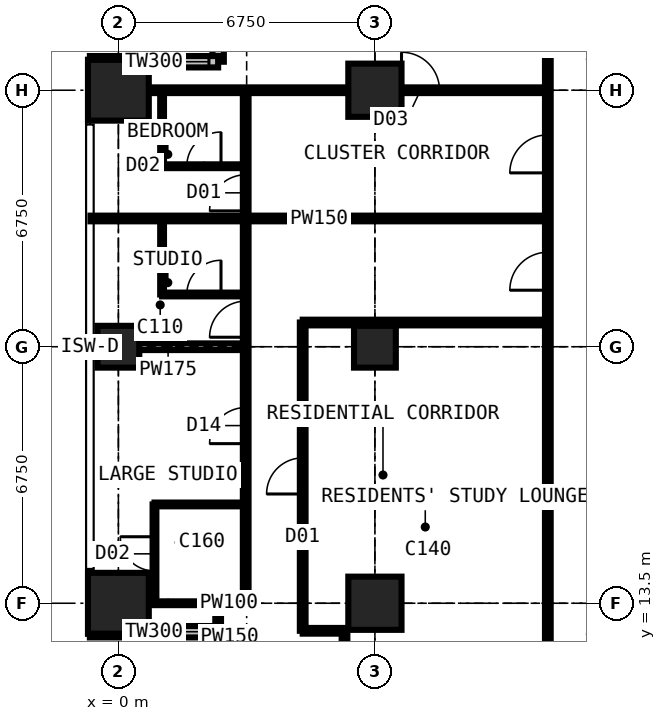
"""IFC4 building model, lengths in metres.
Left out: names, types, materials, properties, quantities, classifications, styles, units other than length and angle.
Written with IfcOpenShell. Run it as: python <this file> out.ifc"""

import sys

from ifc_helpers import new_model, si_unit, direction, frame, frame_2d, origin, origin_2d, place, context, subcontext, project, spatial, rectangle, extrude, element, fill, save


model = new_model("IFC4")
c1 = context("Model", 3, precision=1e-05, world=origin(), true_north=direction((0.0, 1.0)))
c2 = subcontext(c1, "Body", "Model", "MODEL_VIEW")
j1 = project(units=[si_unit("LENGTHUNIT", "METRE"), si_unit("PLANEANGLEUNIT", "RADIAN")], contexts=[c1])
p1 = place(None, origin())
s1 = spatial("IfcSite", under=j1, at=p1, CompositionType="ELEMENT")
p2 = place(p1, origin())
s2 = spatial("IfcBuilding", under=s1, at=p2, CompositionType="ELEMENT")
p3 = place(p2, frame((0.0, 0.0, 207.9)))
s3 = spatial("IfcBuildingStorey", under=s2, at=p3, CompositionType="ELEMENT", Elevation=207.9)
p4 = place(p3, frame((0.0, 13.5, 0.0), z_axis=(0.0, 0.0, 1.0), x_axis=(1.0, 0.0, 0.0)))
e1 = element("IfcColumn", 1, at=p4, inside=s3, PredefinedType="COLUMN", context=c2, shape_type="SweptSolid", body=[
    extrude(rectangle(XDim=1.6, YDim=1.6, at=origin_2d()), origin(), (0.0, 0.0, 1.0), 3.6),
])
p5 = place(p3, frame((0.0, 20.25, 0.0), z_axis=(0.0, 0.0, 1.0), x_axis=(1.0, 0.0, 0.0)))
e2 = element("IfcColumn", 2, at=p5, inside=s3, PredefinedType="COLUMN", context=c2, shape_type="SweptSolid", body=[
    extrude(rectangle(XDim=1.1, YDim=1.1, at=origin_2d()), origin(), (0.0, 0.0, 1.0), 3.6),
])
p6 = place(p3, frame((0.0, 27.0, 0.0), z_axis=(0.0, 0.0, 1.0), x_axis=(1.0, 0.0, 0.0)))
e3 = element("IfcColumn", 3, at=p6, inside=s3, PredefinedType="COLUMN", context=c2, shape_type="SweptSolid", body=[
    extrude(rectangle(XDim=1.6, YDim=1.6, at=origin_2d()), origin(), (0.0, 0.0, 1.0), 3.6),
])
p7 = place(p3, frame((6.75, 13.5, 0.0), z_axis=(0.0, 0.0, 1.0), x_axis=(1.0, 0.0, 0.0)))
e4 = element("IfcColumn", 4, at=p7, inside=s3, PredefinedType="COLUMN", context=c2, shape_type="SweptSolid", body=[
    extrude(rectangle(XDim=1.4, YDim=1.4, at=origin_2d()), origin(), (0.0, 0.0, 1.0), 3.6),
])
p8 = place(p3, frame((6.75, 20.25, 0.0), z_axis=(0.0, 0.0, 1.0), x_axis=(1.0, 0.0, 0.0)))
e5 = element("IfcColumn", 5, at=p8, inside=s3, PredefinedType="COLUMN", context=c2, shape_type="SweptSolid", body=[
    extrude(rectangle(XDim=1.1, YDim=1.1, at=origin_2d()), origin(), (0.0, 0.0, 1.0), 3.6),
])
p9 = place(p3, frame((6.75, 27.0, 0.0), z_axis=(0.0, 0.0, 1.0), x_axis=(1.0, 0.0, 0.0)))
e6 = element("IfcColumn", 6, at=p9, inside=s3, PredefinedType="COLUMN", context=c2, shape_type="SweptSolid", body=[
    extrude(rectangle(XDim=1.4, YDim=1.4, at=origin_2d()), origin(), (0.0, 0.0, 1.0), 3.6),
])
p10 = place(p3, frame((2.625, 31.125, 0.0), z_axis=(0.0, 0.0, 1.0), x_axis=(0.0, -1.0, 0.0)))
e7 = element("IfcWall", 7, at=p10, inside=s3, PredefinedType="SOLIDWALL", context=c2, shape_type="SweptSolid", body=[
    extrude(rectangle(XDim=3.375, YDim=0.3, at=frame_2d((1.688, 0.0))), origin(), (0.0, 0.0, 1.0), 3.375),
])
p11 = place(p10, frame((0.788, 0.0, 0.6)))
e8 = element("IfcOpeningElement", 8, at=p11, cuts=e7, PredefinedType="OPENING", context=c2, shape_type="SweptSolid", body=[
    extrude(rectangle(XDim=1.8, YDim=2.1, at=frame_2d((0.9, 1.05))), frame((0.0, 0.16, 0.0), z_axis=(0.0, -1.0, 0.0), x_axis=(1.0, 0.0, 0.0)), (0.0, 0.0, 1.0), 0.32),
])
p12 = place(p3, frame((2.625, 27.75, 0.0), z_axis=(0.0, 0.0, 1.0), x_axis=(-1.0, 0.0, 0.0)))
e9 = element("IfcWall", 9, at=p12, inside=s3, PredefinedType="SOLIDWALL", context=c2, shape_type="SweptSolid", body=[
    extrude(rectangle(XDim=3.375, YDim=0.3, at=frame_2d((1.688, 0.0))), origin(), (0.0, 0.0, 1.0), 3.375),
])
p13 = place(p12, frame((0.242, 0.0, 0.9)))
e10 = element("IfcOpeningElement", 10, at=p13, cuts=e9, PredefinedType="OPENING", context=c2, shape_type="SweptSolid", body=[
    extrude(rectangle(XDim=1.5, YDim=1.8, at=frame_2d((0.75, 0.9))), frame((0.0, 0.16, 0.0), z_axis=(0.0, -1.0, 0.0), x_axis=(1.0, 0.0, 0.0)), (0.0, 0.0, 1.0), 0.32),
])
p14 = place(p3, frame((-0.75, 12.75, 0.0), z_axis=(0.0, 0.0, 1.0), x_axis=(1.0, 0.0, 0.0)))
e11 = element("IfcWall", 11, at=p14, inside=s3, PredefinedType="SOLIDWALL", context=c2, shape_type="SweptSolid", body=[
    extrude(rectangle(XDim=3.375, YDim=0.3, at=frame_2d((1.688, 0.0))), origin(), (0.0, 0.0, 1.0), 3.375),
])
p15 = place(p14, frame((1.633, 0.0, 0.9)))
e12 = element("IfcOpeningElement", 12, at=p15, cuts=e11, PredefinedType="OPENING", context=c2, shape_type="SweptSolid", body=[
    extrude(rectangle(XDim=1.5, YDim=1.8, at=frame_2d((0.75, 0.9))), frame((0.0, 0.16, 0.0), z_axis=(0.0, -1.0, 0.0), x_axis=(1.0, 0.0, 0.0)), (0.0, 0.0, 1.0), 0.32),
])
p16 = place(p3, frame((2.625, 12.75, 0.0), z_axis=(0.0, 0.0, 1.0), x_axis=(0.0, -1.0, 0.0)))
e13 = element("IfcWall", 13, at=p16, inside=s3, PredefinedType="SOLIDWALL", context=c2, shape_type="SweptSolid", body=[
    extrude(rectangle(XDim=3.375, YDim=0.3, at=frame_2d((1.688, 0.0))), origin(), (0.0, 0.0, 1.0), 3.375),
])
p17 = place(p16, frame((0.788, 0.0, 0.6)))
e14 = element("IfcOpeningElement", 14, at=p17, cuts=e13, PredefinedType="OPENING", context=c2, shape_type="SweptSolid", body=[
    extrude(rectangle(XDim=1.8, YDim=2.1, at=frame_2d((0.9, 1.05))), frame((0.0, 0.16, 0.0), z_axis=(0.0, -1.0, 0.0), x_axis=(1.0, 0.0, 0.0)), (0.0, 0.0, 1.0), 0.32),
])
p18 = place(p3, frame((-0.734, 13.5, 0.0), z_axis=(0.0, 0.0, 1.0), x_axis=(1.0, 0.0, 0.0)))
e15 = element("IfcWall", 15, at=p18, inside=s3, PredefinedType="PARTITIONING", context=c2, shape_type="SweptSolid", body=[
    extrude(rectangle(XDim=4.084, YDim=0.1, at=frame_2d((2.042, 0.0))), origin(), (0.0, 0.0, 1.0), 2.877),
])
p19 = place(p3, frame((-0.734, 20.25, 0.0), z_axis=(0.0, 0.0, 1.0), x_axis=(1.0, 0.0, 0.0)))
e16 = element("IfcWall", 16, at=p19, inside=s3, PredefinedType="PARTITIONING", context=c2, shape_type="SweptSolid", body=[
    extrude(rectangle(XDim=4.084, YDim=0.175, at=frame_2d((2.042, 0.0))), origin(), (0.0, 0.0, 1.0), 2.877),
])
p20 = place(p3, frame((-0.734, 23.625, 0.0), z_axis=(0.0, 0.0, 1.0), x_axis=(1.0, 0.0, 0.0)))
e17 = element("IfcWall", 17, at=p20, inside=s3, PredefinedType="PARTITIONING", context=c2, shape_type="SweptSolid", body=[
    extrude(rectangle(XDim=12.034, YDim=0.15, at=frame_2d((6.017, 0.0))), origin(), (0.0, 0.0, 1.0), 3.375),
])
p21 = place(p3, frame((-0.734, 27.0, 0.0), z_axis=(0.0, 0.0, 1.0), x_axis=(1.0, 0.0, 0.0)))
e18 = element("IfcWall", 18, at=p21, inside=s3, PredefinedType="PARTITIONING", context=c2, shape_type="SweptSolid", body=[
    extrude(rectangle(XDim=12.034, YDim=0.15, at=frame_2d((6.017, 0.0))), origin(), (0.0, 0.0, 1.0), 2.877),
])
p22 = place(p21, frame((8.184, 0.0, 0.0)))
e19 = element("IfcOpeningElement", 19, at=p22, cuts=e18, PredefinedType="OPENING", context=c2, shape_type="SweptSolid", body=[
    extrude(rectangle(XDim=1.0, YDim=2.2, at=frame_2d((0.5, 1.1))), frame((0.0, 0.085, 0.0), z_axis=(0.0, -1.0, 0.0), x_axis=(1.0, 0.0, 0.0)), (0.0, 0.0, 1.0), 0.17),
])
p23 = place(p3, frame((0.95, 13.5, 0.0), z_axis=(0.0, 0.0, 1.0), x_axis=(0.0, 1.0, 0.0)))
e20 = element("IfcWall", 20, at=p23, inside=s3, PredefinedType="PARTITIONING", context=c2, shape_type="SweptSolid", body=[
    extrude(rectangle(XDim=2.6, YDim=0.1, at=frame_2d((1.3, 0.0))), origin(), (0.0, 0.0, 1.0), 3.375),
])
p24 = place(p23, frame((0.85, 0.0, 0.0)))
e21 = element("IfcOpeningElement", 21, at=p24, cuts=e20, PredefinedType="OPENING", context=c2, shape_type="SweptSolid", body=[
    extrude(rectangle(XDim=0.9, YDim=2.2, at=frame_2d((0.45, 1.1))), frame((0.0, 0.06, 0.0), z_axis=(0.0, -1.0, 0.0), x_axis=(1.0, 0.0, 0.0)), (0.0, 0.0, 1.0), 0.12),
])
p25 = place(p3, frame((0.95, 16.1, 0.0), z_axis=(0.0, 0.0, 1.0), x_axis=(1.0, 0.0, 0.0)))
e22 = element("IfcWall", 22, at=p25, inside=s3, PredefinedType="PARTITIONING", context=c2, shape_type="SweptSolid", body=[
    extrude(rectangle(XDim=2.4, YDim=0.1, at=frame_2d((1.2, 0.0))), origin(), (0.0, 0.0, 1.0), 3.375),
])
p26 = place(p3, frame((1.15, 21.625, 0.0), z_axis=(0.0, 0.0, 1.0), x_axis=(0.0, 1.0, 0.0)))
e23 = element("IfcWall", 23, at=p26, inside=s3, PredefinedType="PARTITIONING", context=c2, shape_type="SweptSolid", body=[
    extrude(rectangle(XDim=2.0, YDim=0.1, at=frame_2d((1.0, 0.0))), origin(), (0.0, 0.0, 1.0), 3.375),
])
p27 = place(p3, frame((1.15, 21.625, 0.0), z_axis=(0.0, 0.0, 1.0), x_axis=(1.0, 0.0, 0.0)))
e24 = element("IfcWall", 24, at=p27, inside=s3, PredefinedType="PARTITIONING", context=c2, shape_type="SweptSolid", body=[
    extrude(rectangle(XDim=2.2, YDim=0.1, at=frame_2d((1.1, 0.0))), origin(), (0.0, 0.0, 1.0), 3.375),
])
p28 = place(p27, frame((0.65, 0.0, 0.0)))
e25 = element("IfcOpeningElement", 25, at=p28, cuts=e24, PredefinedType="OPENING", context=c2, shape_type="SweptSolid", body=[
    extrude(rectangle(XDim=0.9, YDim=2.2, at=frame_2d((0.45, 1.1))), frame((0.0, 0.06, 0.0), z_axis=(0.0, -1.0, 0.0), x_axis=(1.0, 0.0, 0.0)), (0.0, 0.0, 1.0), 0.12),
])
p29 = place(p3, frame((1.15, 25.0, 0.0), z_axis=(0.0, 0.0, 1.0), x_axis=(0.0, 1.0, 0.0)))
e26 = element("IfcWall", 26, at=p29, inside=s3, PredefinedType="PARTITIONING", context=c2, shape_type="SweptSolid", body=[
    extrude(rectangle(XDim=2.0, YDim=0.1, at=frame_2d((1.0, 0.0))), origin(), (0.0, 0.0, 1.0), 3.375),
])
p30 = place(p3, frame((1.15, 25.0, 0.0), z_axis=(0.0, 0.0, 1.0), x_axis=(1.0, 0.0, 0.0)))
e27 = element("IfcWall", 27, at=p30, inside=s3, PredefinedType="PARTITIONING", context=c2, shape_type="SweptSolid", body=[
    extrude(rectangle(XDim=2.2, YDim=0.1, at=frame_2d((1.1, 0.0))), origin(), (0.0, 0.0, 1.0), 3.375),
])
p31 = place(p30, frame((0.65, 0.0, 0.0)))
e28 = element("IfcOpeningElement", 28, at=p31, cuts=e27, PredefinedType="OPENING", context=c2, shape_type="SweptSolid", body=[
    extrude(rectangle(XDim=0.9, YDim=2.2, at=frame_2d((0.45, 1.1))), frame((0.0, 0.06, 0.0), z_axis=(0.0, -1.0, 0.0), x_axis=(1.0, 0.0, 0.0)), (0.0, 0.0, 1.0), 0.12),
])
p32 = place(p3, frame((2.625, 12.766, 0.0), z_axis=(0.0, 0.0, 1.0), x_axis=(0.0, 1.0, 0.0)))
e29 = element("IfcWall", 29, at=p32, inside=s3, PredefinedType="PARTITIONING", context=c2, shape_type="SweptSolid", body=[
    extrude(rectangle(XDim=0.734, YDim=0.15, at=frame_2d((0.367, 0.0))), origin(), (0.0, 0.0, 1.0), 3.375),
])
p33 = place(p3, frame((3.35, 13.5, 0.0), z_axis=(0.0, 0.0, 1.0), x_axis=(0.0, 1.0, 0.0)))
e30 = element("IfcWall", 30, at=p33, inside=s3, PredefinedType="PARTITIONING", context=c2, shape_type="SweptSolid", body=[
    extrude(rectangle(XDim=13.5, YDim=0.15, at=frame_2d((6.75, 0.0))), origin(), (0.0, 0.0, 1.0), 3.375),
])
p34 = place(p33, frame((10.325, 0.0, 0.0)))
e31 = element("IfcOpeningElement", 31, at=p34, cuts=e30, PredefinedType="OPENING", context=c2, shape_type="SweptSolid", body=[
    extrude(rectangle(XDim=0.95, YDim=2.2, at=frame_2d((0.475, 1.1))), frame((0.0, 0.085, 0.0), z_axis=(0.0, -1.0, 0.0), x_axis=(1.0, 0.0, 0.0)), (0.0, 0.0, 1.0), 0.17),
])
p35 = place(p33, frame((4.2, 0.0, 0.0)))
e32 = element("IfcOpeningElement", 32, at=p35, cuts=e30, PredefinedType="OPENING", context=c2, shape_type="SweptSolid", body=[
    extrude(rectangle(XDim=0.95, YDim=2.2, at=frame_2d((0.475, 1.1))), frame((0.0, 0.085, 0.0), z_axis=(0.0, -1.0, 0.0), x_axis=(1.0, 0.0, 0.0)), (0.0, 0.0, 1.0), 0.17),
])
p36 = place(p33, frame((7.0, 0.0, 0.0)))
e33 = element("IfcOpeningElement", 33, at=p36, cuts=e30, PredefinedType="OPENING", context=c2, shape_type="SweptSolid", body=[
    extrude(rectangle(XDim=0.95, YDim=2.2, at=frame_2d((0.475, 1.1))), frame((0.0, 0.085, 0.0), z_axis=(0.0, -1.0, 0.0), x_axis=(1.0, 0.0, 0.0)), (0.0, 0.0, 1.0), 0.17),
])
p37 = place(p3, frame((4.85, 12.775, 0.0), z_axis=(0.0, 0.0, 1.0), x_axis=(0.0, 1.0, 0.0)))
e34 = element("IfcWall", 34, at=p37, inside=s3, PredefinedType="PARTITIONING", context=c2, shape_type="SweptSolid", body=[
    extrude(rectangle(XDim=8.113, YDim=0.15, at=frame_2d((4.056, 0.0))), origin(), (0.0, 0.0, 1.0), 3.375),
])
p38 = place(p37, frame((3.6, 0.0, 0.0)))
e35 = element("IfcOpeningElement", 35, at=p38, cuts=e34, PredefinedType="OPENING", context=c2, shape_type="SweptSolid", body=[
    extrude(rectangle(XDim=0.95, YDim=2.2, at=frame_2d((0.475, 1.1))), frame((0.0, 0.085, 0.0), z_axis=(0.0, -1.0, 0.0), x_axis=(1.0, 0.0, 0.0)), (0.0, 0.0, 1.0), 0.17),
])
p39 = place(p3, frame((4.85, 12.775, 0.0), z_axis=(0.0, 0.0, 1.0), x_axis=(1.0, 0.0, 0.0)))
e36 = element("IfcWall", 36, at=p39, inside=s3, PredefinedType="PARTITIONING", context=c2, shape_type="SweptSolid", body=[
    extrude(rectangle(XDim=1.1, YDim=0.15, at=frame_2d((0.55, 0.0))), origin(), (0.0, 0.0, 1.0), 3.375),
])
p40 = place(p3, frame((4.85, 20.887, 0.0), z_axis=(0.0, 0.0, 1.0), x_axis=(1.0, 0.0, 0.0)))
e37 = element("IfcWall", 37, at=p40, inside=s3, PredefinedType="PARTITIONING", context=c2, shape_type="SweptSolid", body=[
    extrude(rectangle(XDim=6.45, YDim=0.15, at=frame_2d((3.225, 0.0))), origin(), (0.0, 0.0, 1.0), 3.375),
])
p41 = place(p3, frame((5.95, 10.125, 0.0), z_axis=(0.0, 0.0, 1.0), x_axis=(0.0, 1.0, 0.0)))
e38 = element("IfcWall", 38, at=p41, inside=s3, PredefinedType="PARTITIONING", context=c2, shape_type="SweptSolid", body=[
    extrude(rectangle(XDim=2.65, YDim=0.15, at=frame_2d((1.325, 0.0))), origin(), (0.0, 0.0, 1.0), 3.375),
])
p42 = place(p3, frame((11.3, 11.3, 0.0), z_axis=(0.0, 0.0, 1.0), x_axis=(0.0, 1.0, 0.0)))
e39 = element("IfcWall", 39, at=p42, inside=s3, PredefinedType="PARTITIONING", context=c2, shape_type="SweptSolid", body=[
    extrude(rectangle(XDim=19.3, YDim=0.15, at=frame_2d((9.65, 0.0))), origin(), (0.0, 0.0, 1.0), 3.375),
])
p43 = place(p42, frame((13.525, 0.0, 0.0)))
e40 = element("IfcOpeningElement", 40, at=p43, cuts=e39, PredefinedType="OPENING", context=c2, shape_type="SweptSolid", body=[
    extrude(rectangle(XDim=1.0, YDim=2.2, at=frame_2d((0.5, 1.1))), frame((0.0, 0.085, 0.0), z_axis=(0.0, -1.0, 0.0), x_axis=(1.0, 0.0, 0.0)), (0.0, 0.0, 1.0), 0.17),
])
p44 = place(p42, frame((10.438, 0.0, 0.0)))
e41 = element("IfcOpeningElement", 41, at=p44, cuts=e39, PredefinedType="OPENING", context=c2, shape_type="SweptSolid", body=[
    extrude(rectangle(XDim=1.0, YDim=2.2, at=frame_2d((0.5, 1.1))), frame((0.0, 0.085, 0.0), z_axis=(0.0, -1.0, 0.0), x_axis=(1.0, 0.0, 0.0)), (0.0, 0.0, 1.0), 0.17),
])
p45 = place(p13, origin())
e42 = element("IfcWindow", 42, at=p45, inside=s3, PartitioningType="SINGLE_PANEL", PredefinedType="WINDOW", context=c2, shape_type="SweptSolid", body=[
    extrude(rectangle(XDim=1.5, YDim=1.8, at=frame_2d((0.75, 0.9))), frame((0.0, 0.03, 0.0), z_axis=(0.0, -1.0, 0.0), x_axis=(1.0, 0.0, 0.0)), (0.0, 0.0, 1.0), 0.06),
])
fill(e10, e42)
p46 = place(p15, origin())
e43 = element("IfcWindow", 43, at=p46, inside=s3, PartitioningType="SINGLE_PANEL", PredefinedType="WINDOW", context=c2, shape_type="SweptSolid", body=[
    extrude(rectangle(XDim=1.5, YDim=1.8, at=frame_2d((0.75, 0.9))), frame((0.0, 0.03, 0.0), z_axis=(0.0, -1.0, 0.0), x_axis=(1.0, 0.0, 0.0)), (0.0, 0.0, 1.0), 0.06),
])
fill(e12, e43)
p47 = place(p22, origin())
e44 = element("IfcDoor", 44, at=p47, inside=s3, OperationType="SINGLE_SWING_LEFT", PredefinedType="DOOR", context=c2, shape_type="SweptSolid", body=[
    extrude(rectangle(XDim=1.0, YDim=2.2, at=frame_2d((0.5, 1.1))), frame((0.0, 0.025, 0.0), z_axis=(0.0, -1.0, 0.0), x_axis=(1.0, 0.0, 0.0)), (0.0, 0.0, 1.0), 0.05),
])
fill(e19, e44)
p48 = place(p34, origin())
e45 = element("IfcDoor", 45, at=p48, inside=s3, OperationType="SINGLE_SWING_LEFT", PredefinedType="DOOR", context=c2, shape_type="SweptSolid", body=[
    extrude(rectangle(XDim=0.95, YDim=2.2, at=frame_2d((0.475, 1.1))), frame((0.0, 0.025, 0.0), z_axis=(0.0, -1.0, 0.0), x_axis=(1.0, 0.0, 0.0)), (0.0, 0.0, 1.0), 0.05),
])
fill(e31, e45)
p49 = place(p31, origin())
e46 = element("IfcDoor", 46, at=p49, inside=s3, OperationType="SINGLE_SWING_RIGHT", PredefinedType="DOOR", context=c2, shape_type="SweptSolid", body=[
    extrude(rectangle(XDim=0.9, YDim=2.2, at=frame_2d((0.45, 1.1))), frame((0.0, 0.025, 0.0), z_axis=(0.0, -1.0, 0.0), x_axis=(1.0, 0.0, 0.0)), (0.0, 0.0, 1.0), 0.05),
])
fill(e28, e46)
p50 = place(p43, origin())
e47 = element("IfcDoor", 47, at=p50, inside=s3, OperationType="SINGLE_SWING_LEFT", PredefinedType="DOOR", context=c2, shape_type="SweptSolid", body=[
    extrude(rectangle(XDim=1.0, YDim=2.2, at=frame_2d((0.5, 1.1))), frame((0.0, 0.025, 0.0), z_axis=(0.0, -1.0, 0.0), x_axis=(1.0, 0.0, 0.0)), (0.0, 0.0, 1.0), 0.05),
])
fill(e40, e47)
p51 = place(p35, origin())
e48 = element("IfcDoor", 48, at=p51, inside=s3, OperationType="SINGLE_SWING_LEFT", PredefinedType="DOOR", context=c2, shape_type="SweptSolid", body=[
    extrude(rectangle(XDim=0.95, YDim=2.2, at=frame_2d((0.475, 1.1))), frame((0.0, 0.025, 0.0), z_axis=(0.0, -1.0, 0.0), x_axis=(1.0, 0.0, 0.0)), (0.0, 0.0, 1.0), 0.05),
])
fill(e32, e48)
p52 = place(p24, origin())
e49 = element("IfcDoor", 49, at=p52, inside=s3, OperationType="SINGLE_SWING_RIGHT", PredefinedType="DOOR", context=c2, shape_type="SweptSolid", body=[
    extrude(rectangle(XDim=0.9, YDim=2.2, at=frame_2d((0.45, 1.1))), frame((0.0, 0.025, 0.0), z_axis=(0.0, -1.0, 0.0), x_axis=(1.0, 0.0, 0.0)), (0.0, 0.0, 1.0), 0.05),
])
fill(e21, e49)
p53 = place(p36, origin())
e50 = element("IfcDoor", 50, at=p53, inside=s3, OperationType="SINGLE_SWING_LEFT", PredefinedType="DOOR", context=c2, shape_type="SweptSolid", body=[
    extrude(rectangle(XDim=0.95, YDim=2.2, at=frame_2d((0.475, 1.1))), frame((0.0, 0.025, 0.0), z_axis=(0.0, -1.0, 0.0), x_axis=(1.0, 0.0, 0.0)), (0.0, 0.0, 1.0), 0.05),
])
fill(e33, e50)
p54 = place(p28, origin())
e51 = element("IfcDoor", 51, at=p54, inside=s3, OperationType="SINGLE_SWING_RIGHT", PredefinedType="DOOR", context=c2, shape_type="SweptSolid", body=[
    extrude(rectangle(XDim=0.9, YDim=2.2, at=frame_2d((0.45, 1.1))), frame((0.0, 0.025, 0.0), z_axis=(0.0, -1.0, 0.0), x_axis=(1.0, 0.0, 0.0)), (0.0, 0.0, 1.0), 0.05),
])
fill(e25, e51)
p55 = place(p44, origin())
e52 = element("IfcDoor", 52, at=p55, inside=s3, OperationType="SINGLE_SWING_LEFT", PredefinedType="DOOR", context=c2, shape_type="SweptSolid", body=[
    extrude(rectangle(XDim=1.0, YDim=2.2, at=frame_2d((0.5, 1.1))), frame((0.0, 0.025, 0.0), z_axis=(0.0, -1.0, 0.0), x_axis=(1.0, 0.0, 0.0)), (0.0, 0.0, 1.0), 0.05),
])
fill(e41, e52)
p56 = place(p38, origin())
e53 = element("IfcDoor", 53, at=p56, inside=s3, OperationType="SINGLE_SWING_LEFT", PredefinedType="DOOR", context=c2, shape_type="SweptSolid", body=[
    extrude(rectangle(XDim=0.95, YDim=2.2, at=frame_2d((0.475, 1.1))), frame((0.0, 0.025, 0.0), z_axis=(0.0, -1.0, 0.0), x_axis=(1.0, 0.0, 0.0)), (0.0, 0.0, 1.0), 0.05),
])
fill(e35, e53)
save(model, sys.argv[1])
